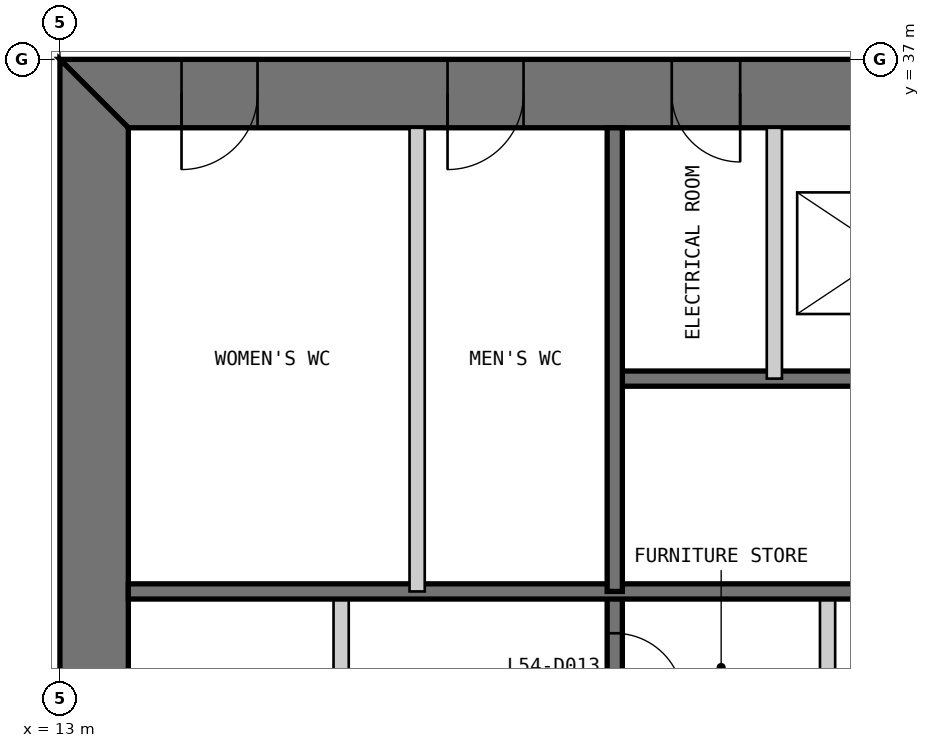
"""IFC4 building model, lengths in metres.
Left out: names, types, materials, properties, quantities, classifications, styles, units other than length and angle.
Written with IfcOpenShell. Run it as: python <this file> out.ifc"""

import sys

from ifc_helpers import new_model, si_unit, direction, frame, frame_2d, origin, place, context, subcontext, project, spatial, polyline, rectangle, outline, extrude, element, fill, save


model = new_model("IFC4")
c1 = context("Model", 3, precision=1e-05, world=origin(), true_north=direction((0.0, 1.0)))
c2 = subcontext(c1, "Body", "Model", "MODEL_VIEW")
j1 = project(units=[si_unit("LENGTHUNIT", "METRE"), si_unit("PLANEANGLEUNIT", "RADIAN")], contexts=[c1])
p1 = place(None, origin())
s1 = spatial("IfcSite", under=j1, at=p1, CompositionType="ELEMENT")
p2 = place(p1, origin())
s2 = spatial("IfcBuilding", under=s1, at=p2, CompositionType="ELEMENT")
p3 = place(p2, frame((0.0, 0.0, 229.8)))
s3 = spatial("IfcBuildingStorey", under=s2, at=p3, CompositionType="ELEMENT", Elevation=229.8)
p4 = place(p3, frame((37.0, 36.55, 0.0), z_axis=(0.0, 0.0, 1.0), x_axis=(-1.0, 0.0, 0.0)))
e1 = element("IfcWall", 1, at=p4, inside=s3, PredefinedType="SHEAR", context=c2, shape_type="SweptSolid", body=[
    extrude(outline(polyline([(0.0, -0.45), (24.0, -0.45), (23.1, 0.45), (0.9, 0.45), (0.0, -0.45)])), origin(), (0.0, 0.0, 1.0), 4.0),
])
p5 = place(p4, frame((4.9, 0.0, 0.0)))
e2 = element("IfcOpeningElement", 2, at=p5, cuts=e1, PredefinedType="OPENING", context=c2, shape_type="SweptSolid", body=[
    extrude(rectangle(XDim=1.0, YDim=2.2, at=frame_2d((0.5, 1.1))), frame((0.0, 0.46, 0.0), z_axis=(0.0, -1.0, 0.0), x_axis=(1.0, 0.0, 0.0)), (0.0, 0.0, 1.0), 0.92),
])
p6 = place(p4, frame((8.9, 0.0, 0.0)))
e3 = element("IfcOpeningElement", 3, at=p6, cuts=e1, PredefinedType="OPENING", context=c2, shape_type="SweptSolid", body=[
    extrude(rectangle(XDim=1.1, YDim=2.2, at=frame_2d((0.55, 1.1))), frame((0.0, 0.46, 0.0), z_axis=(0.0, -1.0, 0.0), x_axis=(1.0, 0.0, 0.0)), (0.0, 0.0, 1.0), 0.92),
])
p7 = place(p4, frame((15.05, 0.0, 0.0)))
e4 = element("IfcOpeningElement", 4, at=p7, cuts=e1, PredefinedType="OPENING", context=c2, shape_type="SweptSolid", body=[
    extrude(rectangle(XDim=0.9, YDim=2.2, at=frame_2d((0.45, 1.1))), frame((0.0, 0.46, 0.0), z_axis=(0.0, -1.0, 0.0), x_axis=(1.0, 0.0, 0.0)), (0.0, 0.0, 1.0), 0.92),
])
p8 = place(p4, frame((17.9, 0.0, 0.0)))
e5 = element("IfcOpeningElement", 5, at=p8, cuts=e1, PredefinedType="OPENING", context=c2, shape_type="SweptSolid", body=[
    extrude(rectangle(XDim=1.0, YDim=2.2, at=frame_2d((0.5, 1.1))), frame((0.0, 0.46, 0.0), z_axis=(0.0, -1.0, 0.0), x_axis=(1.0, 0.0, 0.0)), (0.0, 0.0, 1.0), 0.92),
])
p9 = place(p4, frame((21.4, 0.0, 0.0)))
e6 = element("IfcOpeningElement", 6, at=p9, cuts=e1, PredefinedType="OPENING", context=c2, shape_type="SweptSolid", body=[
    extrude(rectangle(XDim=1.0, YDim=2.2, at=frame_2d((0.5, 1.1))), frame((0.0, 0.46, 0.0), z_axis=(0.0, -1.0, 0.0), x_axis=(1.0, 0.0, 0.0)), (0.0, 0.0, 1.0), 0.92),
])
p10 = place(p3, frame((13.45, 36.1, 0.0), z_axis=(0.0, 0.0, 1.0), x_axis=(0.0, -1.0, 0.0)))
e7 = element("IfcWall", 7, at=p10, inside=s3, PredefinedType="SHEAR", context=c2, shape_type="SweptSolid", body=[
    extrude(outline(polyline([(-0.9, -0.45), (23.1, -0.45), (22.2, 0.45), (0.0, 0.45), (-0.9, -0.45)])), origin(), (0.0, 0.0, 1.0), 4.0),
])
p11 = place(p10, frame((20.2, 0.0, 0.0)))
e8 = element("IfcOpeningElement", 8, at=p11, cuts=e7, PredefinedType="OPENING", context=c2, shape_type="SweptSolid", body=[
    extrude(rectangle(XDim=1.0, YDim=2.2, at=frame_2d((0.5, 1.1))), frame((0.0, 0.46, 0.0), z_axis=(0.0, -1.0, 0.0), x_axis=(1.0, 0.0, 0.0)), (0.0, 0.0, 1.0), 0.92),
])
p12 = place(p10, frame((17.25, 0.0, 0.0)))
e9 = element("IfcOpeningElement", 9, at=p12, cuts=e7, PredefinedType="OPENING", context=c2, shape_type="SweptSolid", body=[
    extrude(rectangle(XDim=0.9, YDim=2.2, at=frame_2d((0.45, 1.1))), frame((0.0, 0.46, 0.0), z_axis=(0.0, -1.0, 0.0), x_axis=(1.0, 0.0, 0.0)), (0.0, 0.0, 1.0), 0.92),
])
p13 = place(p3, frame((16.7, 13.9, 0.0), z_axis=(0.0, 0.0, 1.0), x_axis=(0.0, 1.0, 0.0)))
e10 = element("IfcWall", 10, at=p13, inside=s3, PredefinedType="PARTITIONING", context=c2, shape_type="SweptSolid", body=[
    extrude(rectangle(XDim=16.1, YDim=0.2, at=frame_2d((8.05, 0.0))), origin(), (0.0, 0.0, 1.0), 3.8),
])
p14 = place(p13, frame((6.15, 0.0, 0.0)))
e11 = element("IfcOpeningElement", 11, at=p14, cuts=e10, PredefinedType="OPENING", context=c2, shape_type="SweptSolid", body=[
    extrude(rectangle(XDim=0.9, YDim=2.2, at=frame_2d((0.45, 1.1))), frame((0.0, 0.11, 0.0), z_axis=(0.0, -1.0, 0.0), x_axis=(1.0, 0.0, 0.0)), (0.0, 0.0, 1.0), 0.22),
])
p15 = place(p13, frame((8.6, 0.0, 0.0)))
e12 = element("IfcOpeningElement", 12, at=p15, cuts=e10, PredefinedType="OPENING", context=c2, shape_type="SweptSolid", body=[
    extrude(rectangle(XDim=1.0, YDim=2.2, at=frame_2d((0.5, 1.1))), frame((0.0, 0.11, 0.0), z_axis=(0.0, -1.0, 0.0), x_axis=(1.0, 0.0, 0.0)), (0.0, 0.0, 1.0), 0.22),
])
p16 = place(p13, frame((12.8, 0.0, 0.0)))
e13 = element("IfcOpeningElement", 13, at=p16, cuts=e10, PredefinedType="OPENING", context=c2, shape_type="SweptSolid", body=[
    extrude(rectangle(XDim=0.9, YDim=2.2, at=frame_2d((0.45, 1.1))), frame((0.0, 0.11, 0.0), z_axis=(0.0, -1.0, 0.0), x_axis=(1.0, 0.0, 0.0)), (0.0, 0.0, 1.0), 0.22),
])
p17 = place(p3, frame((20.3, 13.9, 0.0), z_axis=(0.0, 0.0, 1.0), x_axis=(0.0, 1.0, 0.0)))
e14 = element("IfcWall", 14, at=p17, inside=s3, PredefinedType="SOLIDWALL", context=c2, shape_type="SweptSolid", body=[
    extrude(rectangle(XDim=16.1, YDim=0.2, at=frame_2d((8.05, 0.0))), origin(), (0.0, 0.0, 1.0), 3.8),
])
p18 = place(p17, frame((9.65, 0.0, 0.0)))
e15 = element("IfcOpeningElement", 15, at=p18, cuts=e14, PredefinedType="OPENING", context=c2, shape_type="SweptSolid", body=[
    extrude(rectangle(XDim=0.9, YDim=2.2, at=frame_2d((0.45, 1.1))), frame((0.0, 0.11, 0.0), z_axis=(0.0, -1.0, 0.0), x_axis=(1.0, 0.0, 0.0)), (0.0, 0.0, 1.0), 0.22),
])
p19 = place(p17, frame((14.65, 0.0, 0.0)))
e16 = element("IfcOpeningElement", 16, at=p19, cuts=e14, PredefinedType="OPENING", context=c2, shape_type="SweptSolid", body=[
    extrude(rectangle(XDim=0.9, YDim=2.2, at=frame_2d((0.45, 1.1))), frame((0.0, 0.11, 0.0), z_axis=(0.0, -1.0, 0.0), x_axis=(1.0, 0.0, 0.0)), (0.0, 0.0, 1.0), 0.22),
])
p20 = place(p3, frame((23.1, 20.0, 0.0), z_axis=(0.0, 0.0, 1.0), x_axis=(0.0, 1.0, 0.0)))
e17 = element("IfcWall", 17, at=p20, inside=s3, PredefinedType="PARTITIONING", context=c2, shape_type="SweptSolid", body=[
    extrude(rectangle(XDim=10.0, YDim=0.2, at=frame_2d((5.0, 0.0))), origin(), (0.0, 0.0, 1.0), 3.8),
])
p21 = place(p3, frame((29.7, 32.8, 0.0), z_axis=(0.0, 0.0, 1.0), x_axis=(-1.0, 0.0, 0.0)))
e18 = element("IfcWall", 18, at=p21, inside=s3, PredefinedType="SOLIDWALL", context=c2, shape_type="SweptSolid", body=[
    extrude(rectangle(XDim=9.4, YDim=0.2, at=frame_2d((4.7, 0.0))), origin(), (0.0, 0.0, 1.0), 3.8),
])
p22 = place(p21, frame((0.25, 0.0, 0.0)))
e19 = element("IfcOpeningElement", 19, at=p22, cuts=e18, PredefinedType="OPENING", context=c2, shape_type="SweptSolid", body=[
    extrude(rectangle(XDim=1.0, YDim=2.2, at=frame_2d((0.5, 1.1))), frame((0.0, 0.11, 0.0), z_axis=(0.0, -1.0, 0.0), x_axis=(1.0, 0.0, 0.0)), (0.0, 0.0, 1.0), 0.22),
])
p23 = place(p3, frame((29.7, 30.0, 0.0), z_axis=(0.0, 0.0, 1.0), x_axis=(-1.0, 0.0, 0.0)))
e20 = element("IfcWall", 20, at=p23, inside=s3, PredefinedType="SOLIDWALL", context=c2, shape_type="SweptSolid", body=[
    extrude(rectangle(XDim=15.8, YDim=0.2, at=frame_2d((7.9, 0.0))), origin(), (0.0, 0.0, 1.0), 3.8),
])
p24 = place(p3, frame((22.4, 36.1, 0.0), z_axis=(0.0, 0.0, 1.0), x_axis=(0.0, -1.0, 0.0)))
e21 = element("IfcWall", 21, at=p24, inside=s3, PredefinedType="PARTITIONING", context=c2, shape_type="SweptSolid", body=[
    extrude(rectangle(XDim=3.3, YDim=0.2, at=frame_2d((1.65, 0.0))), origin(), (0.0, 0.0, 1.0), 3.8),
])
p25 = place(p3, frame((20.3, 36.1, 0.0), z_axis=(0.0, 0.0, 1.0), x_axis=(0.0, -1.0, 0.0)))
e22 = element("IfcWall", 22, at=p25, inside=s3, PredefinedType="SOLIDWALL", context=c2, shape_type="SweptSolid", body=[
    extrude(rectangle(XDim=6.1, YDim=0.2, at=frame_2d((3.05, 0.0))), origin(), (0.0, 0.0, 1.0), 3.8),
])
p26 = place(p3, frame((17.7, 36.1, 0.0), z_axis=(0.0, 0.0, 1.0), x_axis=(0.0, -1.0, 0.0)))
e23 = element("IfcWall", 23, at=p26, inside=s3, PredefinedType="PARTITIONING", context=c2, shape_type="SweptSolid", body=[
    extrude(rectangle(XDim=6.1, YDim=0.2, at=frame_2d((3.05, 0.0))), origin(), (0.0, 0.0, 1.0), 3.8),
])
p27 = place(p19, frame((0.9, 0.0, 0.0), z_axis=(0.0, 0.0, 1.0), x_axis=(-1.0, 0.0, 0.0)))
e24 = element("IfcDoor", 24, at=p27, inside=s3, OperationType="SINGLE_SWING_RIGHT", PredefinedType="DOOR", context=c2, shape_type="SweptSolid", body=[
    extrude(rectangle(XDim=0.9, YDim=2.2, at=frame_2d((0.45, 1.1))), frame((0.0, 0.025, 0.0), z_axis=(0.0, -1.0, 0.0), x_axis=(1.0, 0.0, 0.0)), (0.0, 0.0, 1.0), 0.05),
])
fill(e16, e24)
p28 = place(p7, origin())
e25 = element("IfcDoor", 25, at=p28, inside=s3, OperationType="SINGLE_SWING_LEFT", PredefinedType="DOOR", context=c2, shape_type="SweptSolid", body=[
    extrude(rectangle(XDim=0.9, YDim=2.2, at=frame_2d((0.45, 1.1))), frame((0.0, 0.025, 0.0), z_axis=(0.0, -1.0, 0.0), x_axis=(1.0, 0.0, 0.0)), (0.0, 0.0, 1.0), 0.05),
    extrude(outline(polyline([(0.0, 0.0), (0.04, 0.0), (0.04, 2.16), (0.86, 2.16), (0.86, 0.0), (0.9, 0.0), (0.9, 2.2), (0.0, 2.2), (0.0, 0.0)])), frame((0.0, 0.3, 0.0), z_axis=(0.0, -1.0, 0.0), x_axis=(1.0, 0.0, 0.0)), (0.0, 0.0, 1.0), 0.6),
])
fill(e4, e25)
p29 = place(p8, origin())
e26 = element("IfcDoor", 26, at=p29, inside=s3, OperationType="SINGLE_SWING_RIGHT", PredefinedType="DOOR", context=c2, shape_type="SweptSolid", body=[
    extrude(rectangle(XDim=1.0, YDim=2.2, at=frame_2d((0.5, 1.1))), frame((0.0, 0.025, 0.0), z_axis=(0.0, -1.0, 0.0), x_axis=(1.0, 0.0, 0.0)), (0.0, 0.0, 1.0), 0.05),
    extrude(outline(polyline([(0.0, 0.0), (0.04, 0.0), (0.04, 2.16), (0.96, 2.16), (0.96, 0.0), (1.0, 0.0), (1.0, 2.2), (0.0, 2.2), (0.0, 0.0)])), frame((0.0, 0.3, 0.0), z_axis=(0.0, -1.0, 0.0), x_axis=(1.0, 0.0, 0.0)), (0.0, 0.0, 1.0), 0.6),
])
fill(e5, e26)
p30 = place(p9, origin())
e27 = element("IfcDoor", 27, at=p30, inside=s3, OperationType="SINGLE_SWING_RIGHT", PredefinedType="DOOR", context=c2, shape_type="SweptSolid", body=[
    extrude(rectangle(XDim=1.0, YDim=2.2, at=frame_2d((0.5, 1.1))), frame((0.0, 0.025, 0.0), z_axis=(0.0, -1.0, 0.0), x_axis=(1.0, 0.0, 0.0)), (0.0, 0.0, 1.0), 0.05),
    extrude(outline(polyline([(0.0, 0.0), (0.04, 0.0), (0.04, 2.16), (0.96, 2.16), (0.96, 0.0), (1.0, 0.0), (1.0, 2.2), (0.0, 2.2), (0.0, 0.0)])), frame((0.0, 0.3, 0.0), z_axis=(0.0, -1.0, 0.0), x_axis=(1.0, 0.0, 0.0)), (0.0, 0.0, 1.0), 0.6),
])
fill(e6, e27)
save(model, sys.argv[1])
